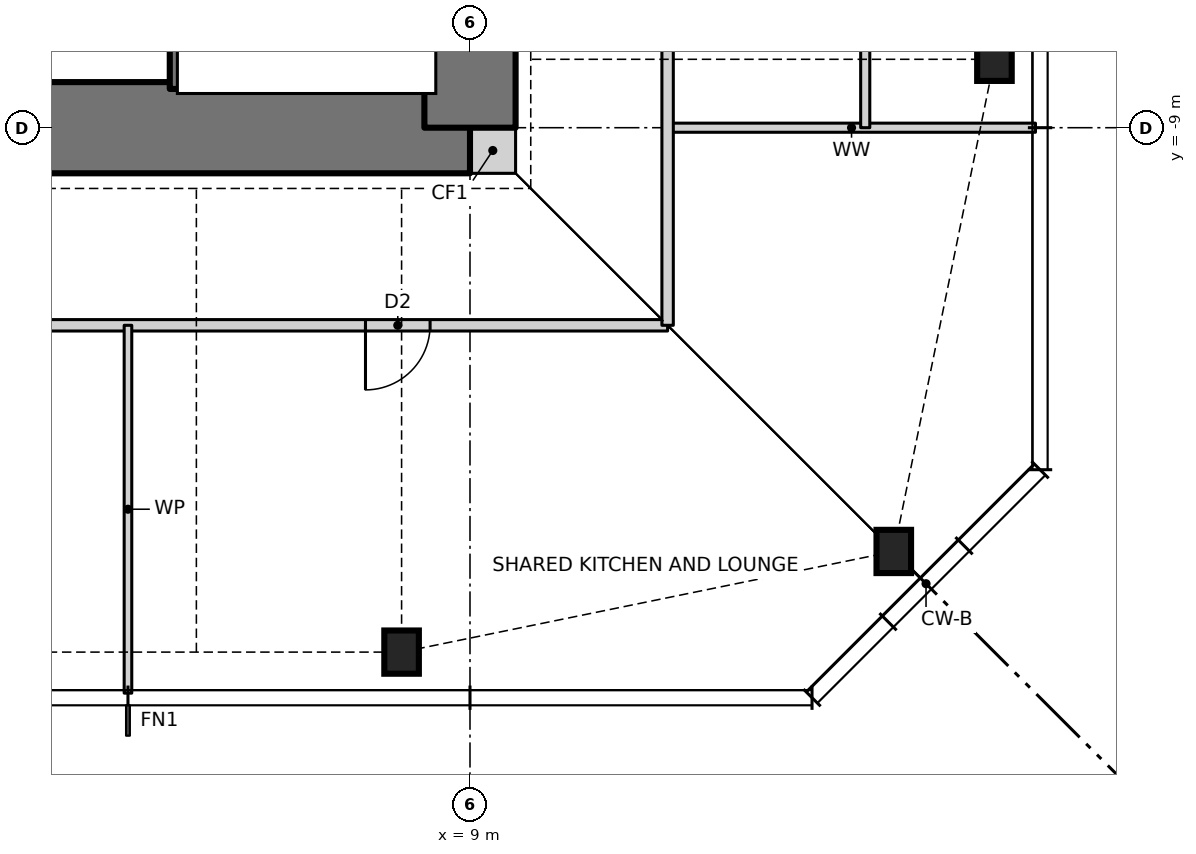
"""IFC4 building model, lengths in metres.
Left out: names, types, materials, properties, quantities, classifications, styles, units other than length and angle.
Written with IfcOpenShell. Run it as: python <this file> out.ifc"""

import sys

from ifc_helpers import new_model, si_unit, direction, frame, frame_2d, origin, origin_2d, place, context, subcontext, project, spatial, rectangle, i_section, extrude, element, fill, save


model = new_model("IFC4")
c1 = context("Model", 3, precision=1e-05, world=origin(), true_north=direction((0.0, 1.0)))
c2 = subcontext(c1, "Body", "Model", "MODEL_VIEW")
j1 = project(units=[si_unit("LENGTHUNIT", "METRE"), si_unit("PLANEANGLEUNIT", "RADIAN")], contexts=[c1])
p1 = place(None, origin())
s1 = spatial("IfcSite", under=j1, at=p1, CompositionType="ELEMENT")
p2 = place(p1, origin())
s2 = spatial("IfcBuilding", under=s1, at=p2, CompositionType="ELEMENT")
p3 = place(p2, frame((0.0, 0.0, 257.0)))
s3 = spatial("IfcBuildingStorey", under=s2, at=p3, CompositionType="ELEMENT", Elevation=257.0)
for number, where, z_axis, x_axis in (
    (1, (8.1, -15.9, 0.0), (0.0, 0.0, 1.0), (1.0, 0.0, 0.0)),
    (2, (14.576, -14.576, 0.0), (0.0, 0.0, 1.0), (1.0, 0.0, 0.0)),
    (3, (15.9, -8.1, 0.0), (0.0, 0.0, 1.0), (1.0, 0.0, 0.0)),
):
    element("IfcColumn", number, at=place(p3, frame(where, z_axis=z_axis, x_axis=x_axis)), inside=s3, PredefinedType="COLUMN", context=c2, shape_type="SweptSolid", body=[
        extrude(i_section(OverallWidth=0.455, OverallDepth=0.569, WebThickness=0.078, FlangeThickness=0.125, at=origin_2d()), origin(), (0.0, 0.0, 1.0), 3.5),
    ])
p4 = place(p3, frame((9.0, -9.3, 0.0), z_axis=(0.0, 0.0, 1.0), x_axis=(1.0, 0.0, 0.0)))
e4 = element("IfcWall", 4, at=p4, inside=s3, PredefinedType="SOLIDWALL", context=c2, shape_type="SweptSolid", body=[
    extrude(rectangle(XDim=0.6, YDim=0.6, at=frame_2d((0.3, 0.0))), origin(), (0.0, 0.0, 1.0), 3.5),
])
p5 = place(p3, frame((-9.0, -9.0, 0.0), z_axis=(0.0, 0.0, 1.0), x_axis=(1.0, 0.0, 0.0)))
e5 = element("IfcWall", 5, at=p5, inside=s3, PredefinedType="SHEAR", context=c2, shape_type="SweptSolid", body=[
    extrude(rectangle(XDim=18.0, YDim=1.2, at=frame_2d((9.0, 0.0))), origin(), (0.0, 0.0, 1.0), 3.5),
])
p6 = place(p5, frame((3.775, 0.0, 0.0)))
e6 = element("IfcOpeningElement", 6, at=p6, cuts=e5, PredefinedType="OPENING", context=c2, shape_type="SweptSolid", body=[
    extrude(rectangle(XDim=0.9, YDim=2.1, at=frame_2d((0.45, 1.05))), frame((0.0, 0.61, 0.0), z_axis=(0.0, -1.0, 0.0), x_axis=(1.0, 0.0, 0.0)), (0.0, 0.0, 1.0), 1.22),
])
p7 = place(p5, frame((10.625, 0.0, 0.0)))
e7 = element("IfcOpeningElement", 7, at=p7, cuts=e5, PredefinedType="OPENING", context=c2, shape_type="SweptSolid", body=[
    extrude(rectangle(XDim=0.9, YDim=2.1, at=frame_2d((0.45, 1.05))), frame((0.0, 0.61, 0.0), z_axis=(0.0, -1.0, 0.0), x_axis=(1.0, 0.0, 0.0)), (0.0, 0.0, 1.0), 1.22),
])
p8 = place(p3, frame((9.0, -9.0, 0.0), z_axis=(0.0, 0.0, 1.0), x_axis=(0.0, 1.0, 0.0)))
e8 = element("IfcWall", 8, at=p8, inside=s3, PredefinedType="SHEAR", context=c2, shape_type="SweptSolid", body=[
    extrude(rectangle(XDim=18.0, YDim=1.2, at=frame_2d((9.0, 0.0))), origin(), (0.0, 0.0, 1.0), 3.5),
])
p9 = place(p8, frame((8.5, 0.0, 0.0)))
e9 = element("IfcOpeningElement", 9, at=p9, cuts=e8, PredefinedType="OPENING", context=c2, shape_type="SweptSolid", body=[
    extrude(rectangle(XDim=1.0, YDim=2.1, at=frame_2d((0.5, 1.05))), frame((0.0, 0.61, 0.0), z_axis=(0.0, -1.0, 0.0), x_axis=(1.0, 0.0, 0.0)), (0.0, 0.0, 1.0), 1.22),
])
p10 = place(p3, frame((-11.6, -11.6, 0.0), z_axis=(0.0, 0.0, 1.0), x_axis=(1.0, 0.0, 0.0)))
e10 = element("IfcWall", 10, at=p10, inside=s3, PredefinedType="PARTITIONING", context=c2, shape_type="SweptSolid", body=[
    extrude(rectangle(XDim=23.2, YDim=0.15, at=frame_2d((11.6, 0.0))), origin(), (0.0, 0.0, 1.0), 3.27),
])
p11 = place(p10, frame((7.5, 0.0, 0.0)))
e11 = element("IfcOpeningElement", 11, at=p11, cuts=e10, PredefinedType="OPENING", context=c2, shape_type="SweptSolid", body=[
    extrude(rectangle(XDim=1.0, YDim=2.1, at=frame_2d((0.5, 1.05))), frame((0.0, 0.085, 0.0), z_axis=(0.0, -1.0, 0.0), x_axis=(1.0, 0.0, 0.0)), (0.0, 0.0, 1.0), 0.17),
])
p12 = place(p10, frame((19.225, 0.0, 0.0)))
e12 = element("IfcOpeningElement", 12, at=p12, cuts=e10, PredefinedType="OPENING", context=c2, shape_type="SweptSolid", body=[
    extrude(rectangle(XDim=0.85, YDim=2.1, at=frame_2d((0.425, 1.05))), frame((0.0, 0.085, 0.0), z_axis=(0.0, -1.0, 0.0), x_axis=(1.0, 0.0, 0.0)), (0.0, 0.0, 1.0), 0.17),
])
p13 = place(p3, frame((11.6, -9.0, 0.0), z_axis=(0.0, 0.0, 1.0), x_axis=(1.0, 0.0, 0.0)))
e13 = element("IfcWall", 13, at=p13, inside=s3, PredefinedType="PARTITIONING", context=c2, shape_type="SweptSolid", body=[
    extrude(rectangle(XDim=4.84, YDim=0.12, at=frame_2d((2.42, 0.0))), origin(), (0.0, 0.0, 1.0), 3.27),
])
p14 = place(p3, frame((14.2, -9.0, 0.0), z_axis=(0.0, 0.0, 1.0), x_axis=(0.0, 1.0, 0.0)))
e14 = element("IfcWall", 14, at=p14, inside=s3, PredefinedType="PARTITIONING", context=c2, shape_type="SweptSolid", body=[
    extrude(rectangle(XDim=2.4, YDim=0.12, at=frame_2d((1.2, 0.0))), origin(), (0.0, 0.0, 1.0), 3.27),
])
p15 = place(p3, frame((11.6, -11.6, 0.0), z_axis=(0.0, 0.0, 1.0), x_axis=(0.0, 1.0, 0.0)))
e15 = element("IfcWall", 15, at=p15, inside=s3, PredefinedType="PARTITIONING", context=c2, shape_type="SweptSolid", body=[
    extrude(rectangle(XDim=23.2, YDim=0.15, at=frame_2d((11.6, 0.0))), origin(), (0.0, 0.0, 1.0), 3.27),
])
p16 = place(p15, frame((5.55, 0.0, 0.0)))
e16 = element("IfcOpeningElement", 16, at=p16, cuts=e15, PredefinedType="OPENING", context=c2, shape_type="SweptSolid", body=[
    extrude(rectangle(XDim=1.0, YDim=2.1, at=frame_2d((0.5, 1.05))), frame((0.0, 0.085, 0.0), z_axis=(0.0, -1.0, 0.0), x_axis=(1.0, 0.0, 0.0)), (0.0, 0.0, 1.0), 0.17),
])
p17 = place(p15, frame((7.65, 0.0, 0.0)))
e17 = element("IfcOpeningElement", 17, at=p17, cuts=e15, PredefinedType="OPENING", context=c2, shape_type="SweptSolid", body=[
    extrude(rectangle(XDim=1.0, YDim=2.1, at=frame_2d((0.5, 1.05))), frame((0.0, 0.085, 0.0), z_axis=(0.0, -1.0, 0.0), x_axis=(1.0, 0.0, 0.0)), (0.0, 0.0, 1.0), 0.17),
])
p18 = place(p15, frame((12.95, 0.0, 0.0)))
e18 = element("IfcOpeningElement", 18, at=p18, cuts=e15, PredefinedType="OPENING", context=c2, shape_type="SweptSolid", body=[
    extrude(rectangle(XDim=1.8, YDim=2.1, at=frame_2d((0.9, 1.05))), frame((0.0, 0.085, 0.0), z_axis=(0.0, -1.0, 0.0), x_axis=(1.0, 0.0, 0.0)), (0.0, 0.0, 1.0), 0.17),
])
p19 = place(p15, frame((18.75, 0.0, 0.0)))
e19 = element("IfcOpeningElement", 19, at=p19, cuts=e15, PredefinedType="OPENING", context=c2, shape_type="SweptSolid", body=[
    extrude(rectangle(XDim=1.8, YDim=2.1, at=frame_2d((0.9, 1.05))), frame((0.0, 0.085, 0.0), z_axis=(0.0, -1.0, 0.0), x_axis=(1.0, 0.0, 0.0)), (0.0, 0.0, 1.0), 0.17),
])
p20 = place(p3, frame((5.15, -8.49, 0.0), z_axis=(0.0, 0.0, 1.0), x_axis=(0.0, 1.0, 0.0)))
e20 = element("IfcWall", 20, at=p20, inside=s3, PredefinedType="SOLIDWALL", context=c2, shape_type="SweptSolid", body=[
    extrude(rectangle(XDim=13.09, YDim=0.2, at=frame_2d((6.545, 0.0))), origin(), (0.0, 0.0, 1.0), 3.5),
])
p21 = place(p20, frame((7.89, 0.0, 0.0)))
e21 = element("IfcOpeningElement", 21, at=p21, cuts=e20, PredefinedType="OPENING", context=c2, shape_type="SweptSolid", body=[
    extrude(rectangle(XDim=1.2, YDim=2.1, at=frame_2d((0.6, 1.05))), frame((0.0, 0.11, 0.0), z_axis=(0.0, -1.0, 0.0), x_axis=(1.0, 0.0, 0.0)), (0.0, 0.0, 1.0), 0.22),
])
p22 = place(p3, frame((4.5, -16.44, 0.0), z_axis=(0.0, 0.0, 1.0), x_axis=(0.0, 1.0, 0.0)))
e22 = element("IfcWall", 22, at=p22, inside=s3, PredefinedType="PARTITIONING", context=c2, shape_type="SweptSolid", body=[
    extrude(rectangle(XDim=4.84, YDim=0.1, at=frame_2d((2.42, 0.0))), origin(), (0.0, 0.0, 1.0), 3.27),
])
p23 = place(p12, frame((0.85, 0.0, 0.0), z_axis=(0.0, 0.0, 1.0), x_axis=(-1.0, 0.0, 0.0)))
e23 = element("IfcDoor", 23, at=p23, inside=s3, OperationType="SINGLE_SWING_RIGHT", PredefinedType="DOOR", context=c2, shape_type="SweptSolid", body=[
    extrude(rectangle(XDim=0.85, YDim=2.1, at=frame_2d((0.425, 1.05))), frame((0.0, 0.025, 0.0), z_axis=(0.0, -1.0, 0.0), x_axis=(1.0, 0.0, 0.0)), (0.0, 0.0, 1.0), 0.05),
])
fill(e12, e23)
save(model, sys.argv[1])
